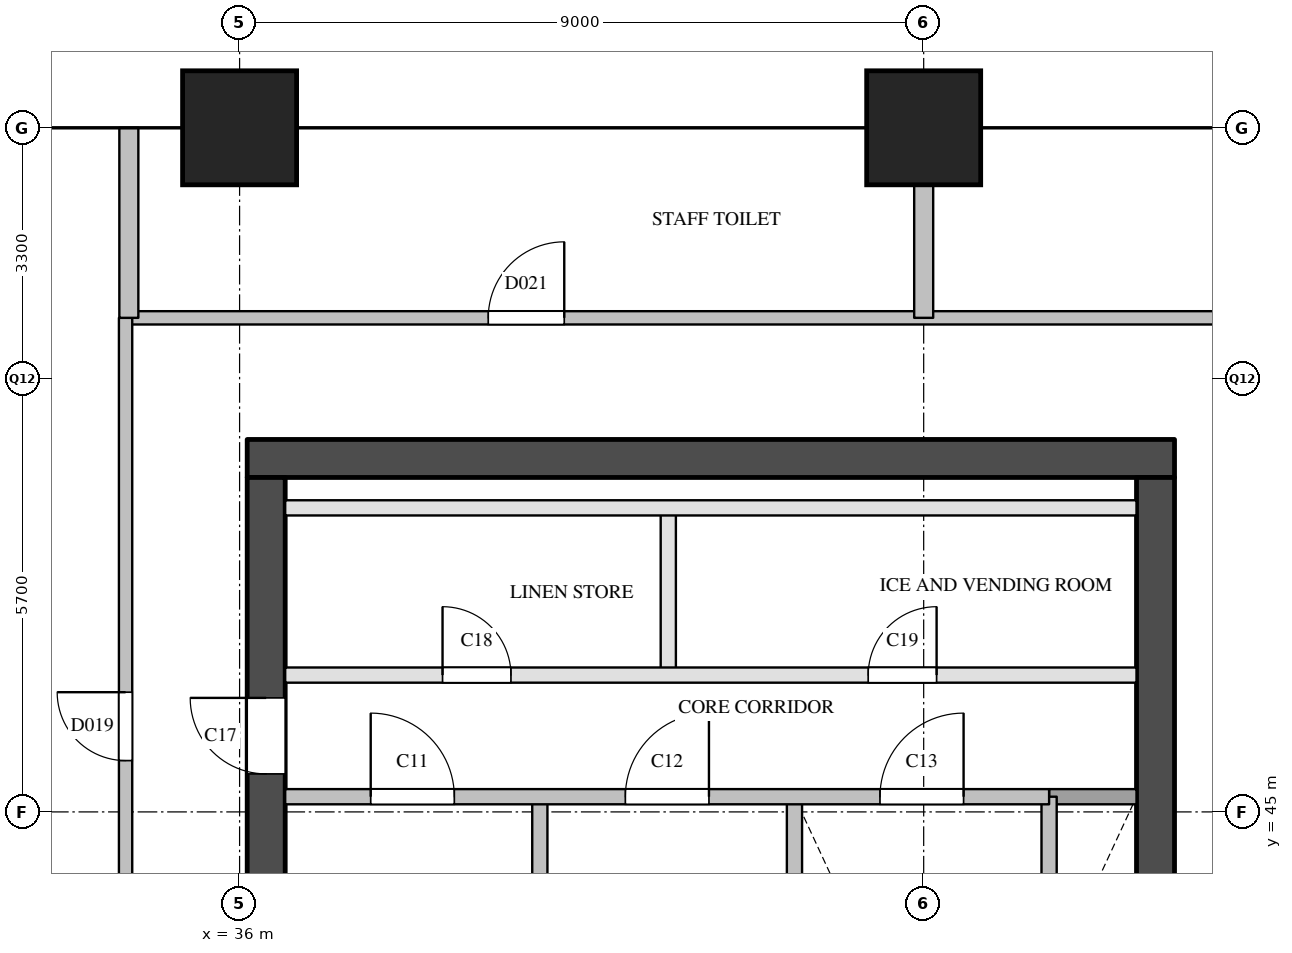
"""IFC4 building model, lengths in metres.
Left out: names, types, materials, properties, quantities, classifications, styles, units other than length and angle.
Written with IfcOpenShell. Run it as: python <this file> out.ifc"""

import sys

from ifc_helpers import new_model, si_unit, direction, frame, frame_2d, origin, origin_2d, place, context, subcontext, project, spatial, rectangle, extrude, element, fill, save


model = new_model("IFC4")
c1 = context("Model", 3, precision=1e-05, world=origin(), true_north=direction((0.0, 1.0)))
c2 = subcontext(c1, "Body", "Model", "MODEL_VIEW")
j1 = project(units=[si_unit("LENGTHUNIT", "METRE"), si_unit("PLANEANGLEUNIT", "RADIAN")], contexts=[c1])
p1 = place(None, origin())
s1 = spatial("IfcSite", under=j1, at=p1, CompositionType="ELEMENT")
p2 = place(p1, origin())
s2 = spatial("IfcBuilding", under=s1, at=p2, CompositionType="ELEMENT")
p3 = place(p2, frame((0.0, 0.0, 142.7)))
s3 = spatial("IfcBuildingStorey", under=s2, at=p3, CompositionType="ELEMENT", Elevation=142.7)
for number, where, z_axis, x_axis in (
    (1, (36.0, 54.0, 0.0), (0.0, 0.0, 1.0), (1.0, 0.0, 0.0)),
    (2, (45.0, 54.0, 0.0), (0.0, 0.0, 1.0), (1.0, 0.0, 0.0)),
):
    element("IfcColumn", number, at=place(p3, frame(where, z_axis=z_axis, x_axis=x_axis)), inside=s3, PredefinedType="COLUMN", context=c2, shape_type="SweptSolid", body=[
        extrude(rectangle(XDim=1.5, YDim=1.5, at=origin_2d()), origin(), (0.0, 0.0, 1.0), 3.9),
    ])
p4 = place(p3, frame((36.1, 49.65, 0.0), z_axis=(0.0, 0.0, 1.0), x_axis=(1.0, 0.0, 0.0)))
e3 = element("IfcWall", 3, at=p4, inside=s3, PredefinedType="SHEAR", context=c2, shape_type="SweptSolid", body=[
    extrude(rectangle(XDim=12.2, YDim=0.5, at=frame_2d((6.1, 0.0))), origin(), (0.0, 0.0, 1.0), 3.6),
])
p5 = place(p3, frame((36.35, 29.1, 0.0), z_axis=(0.0, 0.0, 1.0), x_axis=(0.0, 1.0, 0.0)))
e4 = element("IfcWall", 4, at=p5, inside=s3, PredefinedType="SHEAR", context=c2, shape_type="SweptSolid", body=[
    extrude(rectangle(XDim=20.3, YDim=0.5, at=frame_2d((10.15, 0.0))), origin(), (0.0, 0.0, 1.0), 3.6),
])
p6 = place(p5, frame((3.6, 0.0, 0.0)))
e5 = element("IfcOpeningElement", 5, at=p6, cuts=e4, PredefinedType="OPENING", context=c2, shape_type="SweptSolid", body=[
    extrude(rectangle(XDim=1.8, YDim=2.1, at=frame_2d((0.9, 1.05))), frame((0.0, 0.26, 0.0), z_axis=(0.0, -1.0, 0.0), x_axis=(1.0, 0.0, 0.0)), (0.0, 0.0, 1.0), 0.52),
])
p7 = place(p5, frame((16.4, 0.0, 0.0)))
e6 = element("IfcOpeningElement", 6, at=p7, cuts=e4, PredefinedType="OPENING", context=c2, shape_type="SweptSolid", body=[
    extrude(rectangle(XDim=1.0, YDim=2.1, at=frame_2d((0.5, 1.05))), frame((0.0, 0.26, 0.0), z_axis=(0.0, -1.0, 0.0), x_axis=(1.0, 0.0, 0.0)), (0.0, 0.0, 1.0), 0.52),
])
p8 = place(p3, frame((48.05, 29.1, 0.0), z_axis=(0.0, 0.0, 1.0), x_axis=(0.0, 1.0, 0.0)))
e7 = element("IfcWall", 7, at=p8, inside=s3, PredefinedType="SHEAR", context=c2, shape_type="SweptSolid", body=[
    extrude(rectangle(XDim=20.3, YDim=0.5, at=frame_2d((10.15, 0.0))), origin(), (0.0, 0.0, 1.0), 3.6),
])
p9 = place(p8, frame((12.5, 0.0, 0.0)))
e8 = element("IfcOpeningElement", 8, at=p9, cuts=e7, PredefinedType="OPENING", context=c2, shape_type="SweptSolid", body=[
    extrude(rectangle(XDim=0.7, YDim=2.1, at=frame_2d((0.35, 1.05))), frame((0.0, 0.26, 0.0), z_axis=(0.0, -1.0, 0.0), x_axis=(1.0, 0.0, 0.0)), (0.0, 0.0, 1.0), 0.52),
])
p10 = place(p8, frame((3.9, 0.0, 0.0)))
e9 = element("IfcOpeningElement", 9, at=p10, cuts=e7, PredefinedType="OPENING", context=c2, shape_type="SweptSolid", body=[
    extrude(rectangle(XDim=1.8, YDim=2.1, at=frame_2d((0.9, 1.05))), frame((0.0, 0.26, 0.0), z_axis=(0.0, -1.0, 0.0), x_axis=(1.0, 0.0, 0.0)), (0.0, 0.0, 1.0), 0.52),
])
p11 = place(p3, frame((39.95, 40.78, 0.0), z_axis=(0.0, 0.0, 1.0), x_axis=(0.0, 1.0, 0.0)))
e10 = element("IfcWall", 10, at=p11, inside=s3, PredefinedType="SOLIDWALL", context=c2, shape_type="SweptSolid", body=[
    extrude(rectangle(XDim=4.42, YDim=0.2, at=frame_2d((2.21, 0.0))), origin(), (0.0, 0.0, 1.0), 3.6),
])
p12 = place(p3, frame((41.64, 46.8, 0.0), z_axis=(0.0, 0.0, 1.0), x_axis=(0.0, 1.0, 0.0)))
e11 = element("IfcWall", 11, at=p12, inside=s3, PredefinedType="PARTITIONING", context=c2, shape_type="SweptSolid", body=[
    extrude(rectangle(XDim=2.2, YDim=0.2, at=frame_2d((1.1, 0.0))), origin(), (0.0, 0.0, 1.0), 3.6),
])
for number, where, z_axis, x_axis in (
    (12, (43.3, 40.78, 0.0), (0.0, 0.0, 1.0), (0.0, 1.0, 0.0)),
    (13, (46.65, 40.78, 0.0), (0.0, 0.0, 1.0), (0.0, 1.0, 0.0)),
):
    element("IfcWall", number, at=place(p3, frame(where, z_axis=z_axis, x_axis=x_axis)), inside=s3, PredefinedType="SOLIDWALL", context=c2, shape_type="SweptSolid", body=[
        extrude(rectangle(XDim=4.42, YDim=0.2, at=frame_2d((2.21, 0.0))), origin(), (0.0, 0.0, 1.0), 3.6),
    ])
p13 = place(p3, frame((46.65, 45.2, 0.0), z_axis=(0.0, 0.0, 1.0), x_axis=(1.0, 0.0, 0.0)))
e14 = element("IfcWall", 14, at=p13, inside=s3, PredefinedType="SOLIDWALL", context=c2, shape_type="SweptSolid", body=[
    extrude(rectangle(XDim=1.15, YDim=0.2, at=frame_2d((0.575, 0.0))), origin(), (0.0, 0.0, 1.0), 3.6),
])
p14 = place(p3, frame((36.6, 45.2, 0.0), z_axis=(0.0, 0.0, 1.0), x_axis=(1.0, 0.0, 0.0)))
e15 = element("IfcWall", 15, at=p14, inside=s3, PredefinedType="SOLIDWALL", context=c2, shape_type="SweptSolid", body=[
    extrude(rectangle(XDim=10.05, YDim=0.2, at=frame_2d((5.025, 0.0))), origin(), (0.0, 0.0, 1.0), 3.6),
])
p15 = place(p14, frame((1.125, 0.0, 0.0)))
e16 = element("IfcOpeningElement", 16, at=p15, cuts=e15, PredefinedType="OPENING", context=c2, shape_type="SweptSolid", body=[
    extrude(rectangle(XDim=1.1, YDim=2.1, at=frame_2d((0.55, 1.05))), frame((0.0, 0.11, 0.0), z_axis=(0.0, -1.0, 0.0), x_axis=(1.0, 0.0, 0.0)), (0.0, 0.0, 1.0), 0.22),
])
p16 = place(p14, frame((4.475, 0.0, 0.0)))
e17 = element("IfcOpeningElement", 17, at=p16, cuts=e15, PredefinedType="OPENING", context=c2, shape_type="SweptSolid", body=[
    extrude(rectangle(XDim=1.1, YDim=2.1, at=frame_2d((0.55, 1.05))), frame((0.0, 0.11, 0.0), z_axis=(0.0, -1.0, 0.0), x_axis=(1.0, 0.0, 0.0)), (0.0, 0.0, 1.0), 0.22),
])
p17 = place(p14, frame((7.825, 0.0, 0.0)))
e18 = element("IfcOpeningElement", 18, at=p17, cuts=e15, PredefinedType="OPENING", context=c2, shape_type="SweptSolid", body=[
    extrude(rectangle(XDim=1.1, YDim=2.1, at=frame_2d((0.55, 1.05))), frame((0.0, 0.11, 0.0), z_axis=(0.0, -1.0, 0.0), x_axis=(1.0, 0.0, 0.0)), (0.0, 0.0, 1.0), 0.22),
])
p18 = place(p3, frame((36.6, 46.8, 0.0), z_axis=(0.0, 0.0, 1.0), x_axis=(1.0, 0.0, 0.0)))
e19 = element("IfcWall", 19, at=p18, inside=s3, PredefinedType="PARTITIONING", context=c2, shape_type="SweptSolid", body=[
    extrude(rectangle(XDim=11.2, YDim=0.2, at=frame_2d((5.6, 0.0))), origin(), (0.0, 0.0, 1.0), 3.6),
])
p19 = place(p18, frame((2.07, 0.0, 0.0)))
e20 = element("IfcOpeningElement", 20, at=p19, cuts=e19, PredefinedType="OPENING", context=c2, shape_type="SweptSolid", body=[
    extrude(rectangle(XDim=0.9, YDim=2.1, at=frame_2d((0.45, 1.05))), frame((0.0, 0.11, 0.0), z_axis=(0.0, -1.0, 0.0), x_axis=(1.0, 0.0, 0.0)), (0.0, 0.0, 1.0), 0.22),
])
p20 = place(p18, frame((7.67, 0.0, 0.0)))
e21 = element("IfcOpeningElement", 21, at=p20, cuts=e19, PredefinedType="OPENING", context=c2, shape_type="SweptSolid", body=[
    extrude(rectangle(XDim=0.9, YDim=2.1, at=frame_2d((0.45, 1.05))), frame((0.0, 0.11, 0.0), z_axis=(0.0, -1.0, 0.0), x_axis=(1.0, 0.0, 0.0)), (0.0, 0.0, 1.0), 0.22),
])
p21 = place(p3, frame((36.6, 49.0, 0.0), z_axis=(0.0, 0.0, 1.0), x_axis=(1.0, 0.0, 0.0)))
e22 = element("IfcWall", 22, at=p21, inside=s3, PredefinedType="PARTITIONING", context=c2, shape_type="SweptSolid", body=[
    extrude(rectangle(XDim=11.2, YDim=0.2, at=frame_2d((5.6, 0.0))), origin(), (0.0, 0.0, 1.0), 3.6),
])
p22 = place(p3, frame((34.542, 51.5, 0.0), z_axis=(0.0, 0.0, 1.0), x_axis=(1.0, 0.0, 0.0)))
e23 = element("IfcWall", 23, at=p22, inside=s3, PredefinedType="PARTITIONING", context=c2, shape_type="SweptSolid", body=[
    extrude(rectangle(XDim=15.357, YDim=0.175, at=frame_2d((7.679, 0.0))), origin(), (0.0, 0.0, 1.0), 3.6),
])
p23 = place(p22, frame((4.729, 0.0, 0.0)))
e24 = element("IfcOpeningElement", 24, at=p23, cuts=e23, PredefinedType="OPENING", context=c2, shape_type="SweptSolid", body=[
    extrude(rectangle(XDim=1.0, YDim=2.1, at=frame_2d((0.5, 1.05))), frame((0.0, 0.097, 0.0), z_axis=(0.0, -1.0, 0.0), x_axis=(1.0, 0.0, 0.0)), (0.0, 0.0, 1.0), 0.195),
])
p24 = place(p3, frame((34.5, 40.75, 0.0), z_axis=(0.0, 0.0, 1.0), x_axis=(0.0, 1.0, 0.0)))
e25 = element("IfcWall", 25, at=p24, inside=s3, PredefinedType="PARTITIONING", context=c2, shape_type="SweptSolid", body=[
    extrude(rectangle(XDim=10.75, YDim=0.175, at=frame_2d((5.375, 0.0))), origin(), (0.0, 0.0, 1.0), 3.6),
])
p25 = place(p24, frame((4.925, 0.0, 0.0)))
e26 = element("IfcOpeningElement", 26, at=p25, cuts=e25, PredefinedType="OPENING", context=c2, shape_type="SweptSolid", body=[
    extrude(rectangle(XDim=0.9, YDim=2.1, at=frame_2d((0.45, 1.05))), frame((0.0, 0.097, 0.0), z_axis=(0.0, -1.0, 0.0), x_axis=(1.0, 0.0, 0.0)), (0.0, 0.0, 1.0), 0.195),
])
p26 = place(p3, frame((34.543, 51.5, 0.0), z_axis=(0.0, 0.0, 1.0), x_axis=(0.0, 1.0, 0.0)))
e27 = element("IfcWall", 27, at=p26, inside=s3, PredefinedType="PARTITIONING", context=c2, shape_type="SweptSolid", body=[
    extrude(rectangle(XDim=2.5, YDim=0.25, at=frame_2d((1.25, 0.0))), origin(), (0.0, 0.0, 1.0), 2.6),
])
p27 = place(p3, frame((45.0, 51.5, 0.0), z_axis=(0.0, 0.0, 1.0), x_axis=(0.0, 1.0, 0.0)))
e28 = element("IfcWall", 28, at=p27, inside=s3, PredefinedType="PARTITIONING", context=c2, shape_type="SweptSolid", body=[
    extrude(rectangle(XDim=2.5, YDim=0.25, at=frame_2d((1.25, 0.0))), origin(), (0.0, 0.0, 1.0), 3.6),
])
p28 = place(p15, origin())
e29 = element("IfcDoor", 29, at=p28, inside=s3, OperationType="SINGLE_SWING_LEFT", PredefinedType="DOOR", context=c2, shape_type="SweptSolid", body=[
    extrude(rectangle(XDim=1.1, YDim=2.1, at=frame_2d((0.55, 1.05))), frame((0.0, 0.025, 0.0), z_axis=(0.0, -1.0, 0.0), x_axis=(1.0, 0.0, 0.0)), (0.0, 0.0, 1.0), 0.05),
])
fill(e16, e29)
p29 = place(p16, origin())
e30 = element("IfcDoor", 30, at=p29, inside=s3, OperationType="SINGLE_SWING_RIGHT", PredefinedType="DOOR", context=c2, shape_type="SweptSolid", body=[
    extrude(rectangle(XDim=1.1, YDim=2.1, at=frame_2d((0.55, 1.05))), frame((0.0, 0.025, 0.0), z_axis=(0.0, -1.0, 0.0), x_axis=(1.0, 0.0, 0.0)), (0.0, 0.0, 1.0), 0.05),
])
fill(e17, e30)
p30 = place(p17, origin())
e31 = element("IfcDoor", 31, at=p30, inside=s3, OperationType="SINGLE_SWING_RIGHT", PredefinedType="DOOR", context=c2, shape_type="SweptSolid", body=[
    extrude(rectangle(XDim=1.1, YDim=2.1, at=frame_2d((0.55, 1.05))), frame((0.0, 0.025, 0.0), z_axis=(0.0, -1.0, 0.0), x_axis=(1.0, 0.0, 0.0)), (0.0, 0.0, 1.0), 0.05),
])
fill(e18, e31)
p31 = place(p7, origin())
e32 = element("IfcDoor", 32, at=p31, inside=s3, OperationType="SINGLE_SWING_RIGHT", PredefinedType="DOOR", context=c2, shape_type="SweptSolid", body=[
    extrude(rectangle(XDim=1.0, YDim=2.1, at=frame_2d((0.5, 1.05))), frame((0.0, 0.025, 0.0), z_axis=(0.0, -1.0, 0.0), x_axis=(1.0, 0.0, 0.0)), (0.0, 0.0, 1.0), 0.05),
])
fill(e6, e32)
p32 = place(p19, origin())
e33 = element("IfcDoor", 33, at=p32, inside=s3, OperationType="SINGLE_SWING_LEFT", PredefinedType="DOOR", context=c2, shape_type="SweptSolid", body=[
    extrude(rectangle(XDim=0.9, YDim=2.1, at=frame_2d((0.45, 1.05))), frame((0.0, 0.025, 0.0), z_axis=(0.0, -1.0, 0.0), x_axis=(1.0, 0.0, 0.0)), (0.0, 0.0, 1.0), 0.05),
])
fill(e20, e33)
p33 = place(p20, origin())
e34 = element("IfcDoor", 34, at=p33, inside=s3, OperationType="SINGLE_SWING_RIGHT", PredefinedType="DOOR", context=c2, shape_type="SweptSolid", body=[
    extrude(rectangle(XDim=0.9, YDim=2.1, at=frame_2d((0.45, 1.05))), frame((0.0, 0.025, 0.0), z_axis=(0.0, -1.0, 0.0), x_axis=(1.0, 0.0, 0.0)), (0.0, 0.0, 1.0), 0.05),
])
fill(e21, e34)
p34 = place(p25, origin())
e35 = element("IfcDoor", 35, at=p34, inside=s3, OperationType="SINGLE_SWING_RIGHT", PredefinedType="DOOR", context=c2, shape_type="SweptSolid", body=[
    extrude(rectangle(XDim=0.9, YDim=2.1, at=frame_2d((0.45, 1.05))), frame((0.0, 0.025, 0.0), z_axis=(0.0, -1.0, 0.0), x_axis=(1.0, 0.0, 0.0)), (0.0, 0.0, 1.0), 0.05),
])
fill(e26, e35)
p35 = place(p23, origin())
e36 = element("IfcDoor", 36, at=p35, inside=s3, OperationType="SINGLE_SWING_RIGHT", PredefinedType="DOOR", context=c2, shape_type="SweptSolid", body=[
    extrude(rectangle(XDim=1.0, YDim=2.1, at=frame_2d((0.5, 1.05))), frame((0.0, 0.025, 0.0), z_axis=(0.0, -1.0, 0.0), x_axis=(1.0, 0.0, 0.0)), (0.0, 0.0, 1.0), 0.05),
])
fill(e24, e36)
save(model, sys.argv[1])
